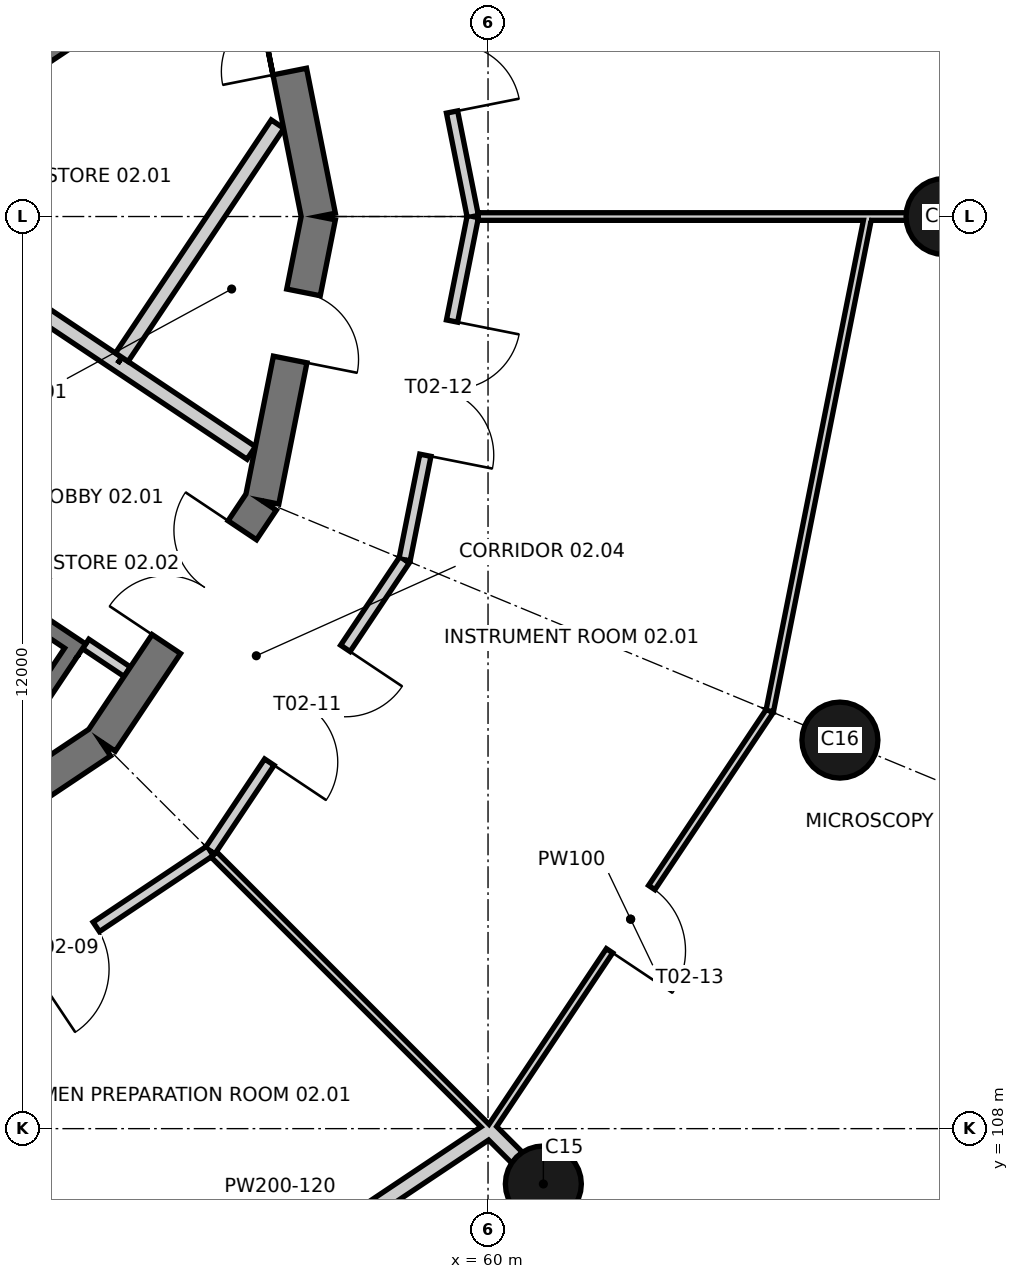
"""IFC4 building model, lengths in metres.
Left out: names, types, materials, properties, quantities, classifications, styles, units other than length and angle.
Written with IfcOpenShell. Run it as: python <this file> out.ifc"""

import sys

from ifc_helpers import new_model, si_unit, direction, frame, frame_2d, origin, origin_2d, place, context, subcontext, project, spatial, polyline, rectangle, circle, outline, extrude, element, fill, save


model = new_model("IFC4")
c1 = context("Model", 3, precision=1e-05, world=origin(), true_north=direction((0.0, 1.0)))
c2 = subcontext(c1, "Body", "Model", "MODEL_VIEW")
j1 = project(units=[si_unit("LENGTHUNIT", "METRE"), si_unit("PLANEANGLEUNIT", "RADIAN")], contexts=[c1])
p1 = place(None, origin())
s1 = spatial("IfcSite", under=j1, at=p1, CompositionType="ELEMENT")
p2 = place(p1, origin())
s2 = spatial("IfcBuilding", under=s1, at=p2, CompositionType="ELEMENT")
p3 = place(p2, frame((0.0, 0.0, 10.8)))
s3 = spatial("IfcBuildingStorey", under=s2, at=p3, CompositionType="ELEMENT", Elevation=10.8)
p4 = place(p3, frame((57.771, 120.0, 0.0), z_axis=(0.0, 0.0, 1.0), x_axis=(-0.195069197673, 0.98078948206, 0.0)))
e1 = element("IfcWall", 1, at=p4, inside=s3, PredefinedType="SHEAR", context=c2, shape_type="SweptSolid", body=[
    extrude(outline(polyline([(-0.045, -0.225), (3.857, -0.225), (3.768, 0.225), (0.045, 0.225), (-0.045, -0.225)])), origin(), (0.0, 0.0, 1.0), 4.8),
])
p5 = place(p4, frame((1.945, 0.0, 0.0)))
e2 = element("IfcOpeningElement", 2, at=p5, cuts=e1, PredefinedType="OPENING", context=c2, shape_type="SweptSolid", body=[
    extrude(rectangle(XDim=0.9, YDim=2.1, at=frame_2d((0.45, 1.05))), frame((0.0, 0.235, 0.0), z_axis=(0.0, -1.0, 0.0), x_axis=(1.0, 0.0, 0.0)), (0.0, 0.0, 1.0), 0.47),
])
p6 = place(p3, frame((51.739, 110.973, 0.0), z_axis=(0.0, 0.0, 1.0), x_axis=(0.83148829117, 0.555542277102, 0.0)))
e3 = element("IfcWall", 3, at=p6, inside=s3, PredefinedType="SHEAR", context=c2, shape_type="SweptSolid", body=[
    extrude(outline(polyline([(-0.045, -0.225), (3.857, -0.225), (3.768, 0.225), (0.045, 0.225), (-0.045, -0.225)])), origin(), (0.0, 0.0, 1.0), 4.8),
])
p7 = place(p6, frame((0.645, 0.0, 0.0)))
e4 = element("IfcOpeningElement", 4, at=p7, cuts=e3, PredefinedType="OPENING", context=c2, shape_type="SweptSolid", body=[
    extrude(rectangle(XDim=0.9, YDim=2.1, at=frame_2d((0.45, 1.05))), frame((0.0, 0.235, 0.0), z_axis=(0.0, -1.0, 0.0), x_axis=(1.0, 0.0, 0.0)), (0.0, 0.0, 1.0), 0.47),
])
p8 = place(p3, frame((54.909, 113.091, 0.0), z_axis=(0.0, 0.0, 1.0), x_axis=(0.555542277102, 0.83148829117, 0.0)))
e5 = element("IfcWall", 5, at=p8, inside=s3, PredefinedType="SHEAR", context=c2, shape_type="SweptSolid", body=[
    extrude(outline(polyline([(-0.045, -0.225), (3.857, -0.225), (3.768, 0.225), (0.045, 0.225), (-0.045, -0.225)])), origin(), (0.0, 0.0, 1.0), 4.8),
])
p9 = place(p8, frame((1.545, 0.0, 0.0)))
e6 = element("IfcOpeningElement", 6, at=p9, cuts=e5, PredefinedType="OPENING", context=c2, shape_type="SweptSolid", body=[
    extrude(rectangle(XDim=1.8, YDim=2.1, at=frame_2d((0.9, 1.05))), frame((0.0, 0.235, 0.0), z_axis=(0.0, -1.0, 0.0), x_axis=(1.0, 0.0, 0.0)), (0.0, 0.0, 1.0), 0.47),
])
p10 = place(p3, frame((57.027, 116.261, 0.0), z_axis=(0.0, 0.0, 1.0), x_axis=(0.195069197673, 0.98078948206, 0.0)))
e7 = element("IfcWall", 7, at=p10, inside=s3, PredefinedType="SHEAR", context=c2, shape_type="SweptSolid", body=[
    extrude(outline(polyline([(-0.045, -0.225), (3.857, -0.225), (3.768, 0.225), (0.045, 0.225), (-0.045, -0.225)])), origin(), (0.0, 0.0, 1.0), 4.8),
])
p11 = place(p10, frame((1.895, 0.0, 0.0)))
e8 = element("IfcOpeningElement", 8, at=p11, cuts=e7, PredefinedType="OPENING", context=c2, shape_type="SweptSolid", body=[
    extrude(rectangle(XDim=0.9, YDim=2.1, at=frame_2d((0.45, 1.05))), frame((0.0, 0.235, 0.0), z_axis=(0.0, -1.0, 0.0), x_axis=(1.0, 0.0, 0.0)), (0.0, 0.0, 1.0), 0.47),
])
p12 = place(p3, frame((50.226, 119.473, 0.0), z_axis=(0.0, 0.0, 1.0), x_axis=(0.831486463828, 0.555545012102, 0.0)))
e9 = element("IfcWall", 9, at=p12, inside=s3, PredefinedType="SHEAR", context=c2, shape_type="SweptSolid", body=[
    extrude(rectangle(XDim=7.8, YDim=0.2, at=frame_2d((3.9, 0.0))), origin(), (0.0, 0.0, 1.0), 4.8),
])
p13 = place(p3, frame((50.16, 117.293, 0.0), z_axis=(0.0, 0.0, 1.0), x_axis=(0.831479497601, -0.55555543834, 0.0)))
e10 = element("IfcWall", 10, at=p13, inside=s3, PredefinedType="SHEAR", context=c2, shape_type="SweptSolid", body=[
    extrude(rectangle(XDim=5.4, YDim=0.2, at=frame_2d((2.7, 0.0))), origin(), (0.0, 0.0, 1.0), 4.8),
])
p14 = place(p13, frame((0.85, 0.0, 0.0)))
e11 = element("IfcOpeningElement", 11, at=p14, cuts=e10, PredefinedType="OPENING", context=c2, shape_type="SweptSolid", body=[
    extrude(rectangle(XDim=1.1, YDim=2.1, at=frame_2d((0.55, 1.05))), frame((0.0, 0.11, 0.0), z_axis=(0.0, -1.0, 0.0), x_axis=(1.0, 0.0, 0.0)), (0.0, 0.0, 1.0), 0.22),
])
p15 = place(p13, frame((3.45, 0.0, 0.0)))
e12 = element("IfcOpeningElement", 12, at=p15, cuts=e10, PredefinedType="OPENING", context=c2, shape_type="SweptSolid", body=[
    extrude(rectangle(XDim=1.1, YDim=2.1, at=frame_2d((0.55, 1.05))), frame((0.0, 0.11, 0.0), z_axis=(0.0, -1.0, 0.0), x_axis=(1.0, 0.0, 0.0)), (0.0, 0.0, 1.0), 0.22),
])
p16 = place(p3, frame((54.512, 114.266, 0.0), z_axis=(0.0, 0.0, 1.0), x_axis=(-0.555589423235, -0.83145678949, 0.0)))
e13 = element("IfcWall", 13, at=p16, inside=s3, PredefinedType="SHEAR", context=c2, shape_type="SweptSolid", body=[
    extrude(rectangle(XDim=1.9, YDim=0.2, at=frame_2d((0.95, 0.0))), origin(), (0.0, 0.0, 1.0), 4.8),
])
for number, where, z_axis, x_axis in (
    (14, (66.0, 120.0, 0.0), (0.0, 0.0, 1.0), (1.0, 0.0, 0.0)),
    (15, (60.728, 107.272, 0.0), (0.0, 0.0, 1.0), (1.0, 0.0, 0.0)),
    (16, (64.63, 113.112, 0.0), (0.0, 0.0, 1.0), (1.0, 0.0, 0.0)),
):
    element("IfcColumn", number, at=place(p3, frame(where, z_axis=z_axis, x_axis=x_axis)), inside=s3, PredefinedType="COLUMN", context=c2, shape_type="SweptSolid", body=[
        extrude(circle(Radius=0.5, at=origin_2d()), origin(), (0.0, 0.0, 1.0), 4.8),
    ])
p17 = place(p3, frame((64.193, 103.807, 0.0), z_axis=(0.0, 0.0, 1.0), x_axis=(0.555576354317, 0.83146552215, 0.0)))
e17 = element("IfcWall", 17, at=p17, inside=s3, PredefinedType="SOLIDWALL", context=c2, shape_type="SweptSolid", body=[
    extrude(outline(polyline([(-0.03, -0.15), (8.965, -0.15), (8.905, 0.15), (0.03, 0.15), (-0.03, -0.15)])), origin(), (0.0, 0.0, 1.0), 3.72),
])
p18 = place(p17, frame((0.834, 0.0, 0.9)))
e18 = element("IfcOpeningElement", 18, at=p18, cuts=e17, PredefinedType="OPENING", context=c2, shape_type="SweptSolid", body=[
    extrude(rectangle(XDim=2.8, YDim=1.8, at=frame_2d((1.4, 0.9))), frame((0.0, 0.16, 0.0), z_axis=(0.0, -1.0, 0.0), x_axis=(1.0, 0.0, 0.0)), (0.0, 0.0, 1.0), 0.32),
])
p19 = place(p17, frame((5.302, 0.0, 0.9)))
e19 = element("IfcOpeningElement", 19, at=p19, cuts=e17, PredefinedType="OPENING", context=c2, shape_type="SweptSolid", body=[
    extrude(rectangle(XDim=2.8, YDim=1.8, at=frame_2d((1.4, 0.9))), frame((0.0, 0.16, 0.0), z_axis=(0.0, -1.0, 0.0), x_axis=(1.0, 0.0, 0.0)), (0.0, 0.0, 1.0), 0.32),
])
p20 = place(p3, frame((55.126, 118.065, 0.0), z_axis=(0.0, 0.0, 1.0), x_axis=(-0.831495502265, 0.555531483998, 0.0)))
e20 = element("IfcWall", 20, at=p20, inside=s3, PredefinedType="SOLIDWALL", context=c2, shape_type="SweptSolid", body=[
    extrude(rectangle(XDim=4.065, YDim=0.2, at=frame_2d((2.033, 0.0))), origin(), (0.0, 0.0, 1.0), 4.52),
])
p21 = place(p3, frame((57.231, 121.215, 0.0), z_axis=(0.0, 0.0, 1.0), x_axis=(-0.555600969312, -0.831449074147, 0.0)))
e21 = element("IfcWall", 21, at=p21, inside=s3, PredefinedType="SOLIDWALL", context=c2, shape_type="SweptSolid", body=[
    extrude(rectangle(XDim=3.689, YDim=0.2, at=frame_2d((1.844, 0.0))), origin(), (0.0, 0.0, 1.0), 4.52),
])
p22 = place(p3, frame((56.885, 116.89, 0.0), z_axis=(0.0, 0.0, 1.0), x_axis=(-0.831446094913, 0.555605427667, 0.0)))
e22 = element("IfcWall", 22, at=p22, inside=s3, PredefinedType="SOLIDWALL", context=c2, shape_type="SweptSolid", body=[
    extrude(rectangle(XDim=2.115, YDim=0.2, at=frame_2d((1.058, 0.0))), origin(), (0.0, 0.0, 1.0), 4.52),
])
p23 = place(p3, frame((54.706, 114.377, 0.0), z_axis=(0.0, 0.0, 1.0), x_axis=(0.831421626399, -0.555642042286, 0.0)))
e23 = element("IfcWall", 23, at=p23, inside=s3, PredefinedType="PARTITIONING", context=c2, shape_type="SweptSolid", body=[
    extrude(rectangle(XDim=0.658, YDim=0.15, at=frame_2d((0.329, 0.0))), origin(), (0.0, 0.0, 1.0), 4.52),
])
p24 = place(p3, frame((58.902, 124.516, 0.0), z_axis=(0.0, 0.0, 1.0), x_axis=(0.19508608079, -0.980786124026, 0.0)))
e24 = element("IfcWall", 24, at=p24, inside=s3, PredefinedType="PARTITIONING", context=c2, shape_type="SweptSolid", body=[
    extrude(rectangle(XDim=4.604, YDim=0.15, at=frame_2d((2.302, 0.0))), origin(), (0.0, 0.0, 1.0), 4.52),
])
p25 = place(p24, frame((1.402, 0.0, 0.0)))
e25 = element("IfcOpeningElement", 25, at=p25, cuts=e24, PredefinedType="OPENING", context=c2, shape_type="SweptSolid", body=[
    extrude(rectangle(XDim=1.8, YDim=2.1, at=frame_2d((0.9, 1.05))), frame((0.0, 0.085, 0.0), z_axis=(0.0, -1.0, 0.0), x_axis=(1.0, 0.0, 0.0)), (0.0, 0.0, 1.0), 0.17),
])
p26 = place(p3, frame((56.344, 111.656, 0.0), z_axis=(0.0, 0.0, 1.0), x_axis=(-0.831486983854, -0.555544233776, 0.0)))
e26 = element("IfcWall", 26, at=p26, inside=s3, PredefinedType="PARTITIONING", context=c2, shape_type="SweptSolid", body=[
    extrude(rectangle(XDim=4.604, YDim=0.15, at=frame_2d((2.302, 0.0))), origin(), (0.0, 0.0, 1.0), 4.52),
])
p27 = place(p26, frame((1.802, 0.0, 0.0)))
e27 = element("IfcOpeningElement", 27, at=p27, cuts=e26, PredefinedType="OPENING", context=c2, shape_type="SweptSolid", body=[
    extrude(rectangle(XDim=1.0, YDim=2.1, at=frame_2d((0.5, 1.05))), frame((0.0, 0.085, 0.0), z_axis=(0.0, -1.0, 0.0), x_axis=(1.0, 0.0, 0.0)), (0.0, 0.0, 1.0), 0.17),
])
p28 = place(p3, frame((59.8, 120.0, 0.0), z_axis=(0.0, 0.0, 1.0), x_axis=(-0.19508608079, -0.980786124026, 0.0)))
e28 = element("IfcWall", 28, at=p28, inside=s3, PredefinedType="PARTITIONING", context=c2, shape_type="SweptSolid", body=[
    extrude(rectangle(XDim=4.604, YDim=0.15, at=frame_2d((2.302, 0.0))), origin(), (0.0, 0.0, 1.0), 4.52),
])
p29 = place(p28, frame((1.402, 0.0, 0.0)))
e29 = element("IfcOpeningElement", 29, at=p29, cuts=e28, PredefinedType="OPENING", context=c2, shape_type="SweptSolid", body=[
    extrude(rectangle(XDim=1.8, YDim=2.1, at=frame_2d((0.9, 1.05))), frame((0.0, 0.085, 0.0), z_axis=(0.0, -1.0, 0.0), x_axis=(1.0, 0.0, 0.0)), (0.0, 0.0, 1.0), 0.17),
])
p30 = place(p3, frame((58.902, 115.484, 0.0), z_axis=(0.0, 0.0, 1.0), x_axis=(-0.555544233776, -0.831486983854, 0.0)))
e30 = element("IfcWall", 30, at=p30, inside=s3, PredefinedType="PARTITIONING", context=c2, shape_type="SweptSolid", body=[
    extrude(rectangle(XDim=4.604, YDim=0.15, at=frame_2d((2.302, 0.0))), origin(), (0.0, 0.0, 1.0), 4.52),
])
p31 = place(p30, frame((1.402, 0.0, 0.0)))
e31 = element("IfcOpeningElement", 31, at=p31, cuts=e30, PredefinedType="OPENING", context=c2, shape_type="SweptSolid", body=[
    extrude(rectangle(XDim=1.8, YDim=2.1, at=frame_2d((0.9, 1.05))), frame((0.0, 0.085, 0.0), z_axis=(0.0, -1.0, 0.0), x_axis=(1.0, 0.0, 0.0)), (0.0, 0.0, 1.0), 0.17),
])
p32 = place(p3, frame((52.543, 109.032, 0.0), z_axis=(0.0, 0.0, 1.0), x_axis=(0.382697954548, -0.923873517093, 0.0)))
e32 = element("IfcWall", 32, at=p32, inside=s3, PredefinedType="PARTITIONING", context=c2, shape_type="SweptSolid", body=[
    extrude(rectangle(XDim=5.128, YDim=0.1, at=frame_2d((2.564, 0.0))), origin(), (0.0, 0.0, 1.0), 3.72),
])
p33 = place(p3, frame((59.983, 107.954, 0.0), z_axis=(0.0, 0.0, 1.0), x_axis=(-0.831469879838, -0.555569832625, 0.0)))
e33 = element("IfcWall", 33, at=p33, inside=s3, PredefinedType="SOLIDWALL", context=c2, shape_type="SweptSolid", body=[
    extrude(rectangle(XDim=6.541, YDim=0.2, at=frame_2d((3.271, 0.0))), origin(), (0.0, 0.0, 1.0), 4.52),
])
p34 = place(p33, frame((2.82, 0.0, 0.0)))
e34 = element("IfcOpeningElement", 34, at=p34, cuts=e33, PredefinedType="OPENING", context=c2, shape_type="SweptSolid", body=[
    extrude(rectangle(XDim=0.9, YDim=2.1, at=frame_2d((0.45, 1.05))), frame((0.0, 0.11, 0.0), z_axis=(0.0, -1.0, 0.0), x_axis=(1.0, 0.0, 0.0)), (0.0, 0.0, 1.0), 0.22),
])
p35 = place(p3, frame((56.395, 111.605, 0.0), z_axis=(0.0, 0.0, 1.0), x_axis=(0.707106781187, -0.707106781187, 0.0)))
e35 = element("IfcWall", 35, at=p35, inside=s3, PredefinedType="PARTITIONING", context=c2, shape_type="SweptSolid", body=[
    extrude(rectangle(XDim=5.128, YDim=0.1, at=frame_2d((2.564, 0.0))), origin(), (0.0, 0.0, 1.0), 3.72),
])
p36 = place(p3, frame((60.021, 107.979, 0.0), z_axis=(0.0, 0.0, 1.0), x_axis=(0.707106781187, -0.707106781187, 0.0)))
e36 = element("IfcWall", 36, at=p36, inside=s3, PredefinedType="SOLIDWALL", context=c2, shape_type="SweptSolid", body=[
    extrude(rectangle(XDim=0.51, YDim=0.2, at=frame_2d((0.255, 0.0))), origin(), (0.0, 0.0, 1.0), 3.72),
])
p37 = place(p3, frame((64.991, 119.955, 0.0), z_axis=(0.0, 0.0, 1.0), x_axis=(-0.195068250166, -0.980789670509, 0.0)))
e37 = element("IfcWall", 37, at=p37, inside=s3, PredefinedType="PARTITIONING", context=c2, shape_type="SweptSolid", body=[
    extrude(rectangle(XDim=6.587, YDim=0.1, at=frame_2d((3.293, 0.0))), origin(), (0.0, 0.0, 1.0), 4.52),
])
p38 = place(p3, frame((63.706, 113.494, 0.0), z_axis=(0.0, 0.0, 1.0), x_axis=(-0.555572294061, -0.831468235155, 0.0)))
e38 = element("IfcWall", 38, at=p38, inside=s3, PredefinedType="PARTITIONING", context=c2, shape_type="SweptSolid", body=[
    extrude(rectangle(XDim=6.587, YDim=0.1, at=frame_2d((3.293, 0.0))), origin(), (0.0, 0.0, 1.0), 4.52),
])
p39 = place(p38, frame((2.793, 0.0, 0.0)))
e39 = element("IfcOpeningElement", 39, at=p39, cuts=e38, PredefinedType="OPENING", context=c2, shape_type="SweptSolid", body=[
    extrude(rectangle(XDim=1.0, YDim=2.1, at=frame_2d((0.5, 1.05))), frame((0.0, 0.06, 0.0), z_axis=(0.0, -1.0, 0.0), x_axis=(1.0, 0.0, 0.0)), (0.0, 0.0, 1.0), 0.12),
])
p40 = place(p3, frame((59.872, 120.0, 0.0), z_axis=(0.0, 0.0, 1.0), x_axis=(1.0, 0.0, 0.0)))
e40 = element("IfcWall", 40, at=p40, inside=s3, PredefinedType="PARTITIONING", context=c2, shape_type="SweptSolid", body=[
    extrude(rectangle(XDim=5.128, YDim=0.1, at=frame_2d((2.564, 0.0))), origin(), (0.0, 0.0, 1.0), 3.72),
])
p41 = place(p3, frame((65.0, 120.0, 0.0), z_axis=(0.0, 0.0, 1.0), x_axis=(1.0, 0.0, 0.0)))
e41 = element("IfcWall", 41, at=p41, inside=s3, PredefinedType="PARTITIONING", context=c2, shape_type="SweptSolid", body=[
    extrude(rectangle(XDim=0.51, YDim=0.1, at=frame_2d((0.255, 0.0))), origin(), (0.0, 0.0, 1.0), 3.72),
])
p42 = place(p5, origin())
e42 = element("IfcDoor", 42, at=p42, inside=s3, OperationType="SINGLE_SWING_LEFT", PredefinedType="DOOR", context=c2, shape_type="SweptSolid", body=[
    extrude(rectangle(XDim=0.9, YDim=2.1, at=frame_2d((0.45, 1.05))), frame((0.0, 0.025, 0.0), z_axis=(0.0, -1.0, 0.0), x_axis=(1.0, 0.0, 0.0)), (0.0, 0.0, 1.0), 0.05),
])
fill(e2, e42)
p43 = place(p11, frame((0.9, 0.0, 0.0), z_axis=(0.0, 0.0, 1.0), x_axis=(-1.0, 0.0, 0.0)))
e43 = element("IfcDoor", 43, at=p43, inside=s3, OperationType="SINGLE_SWING_RIGHT", PredefinedType="DOOR", context=c2, shape_type="SweptSolid", body=[
    extrude(rectangle(XDim=0.9, YDim=2.1, at=frame_2d((0.45, 1.05))), frame((0.0, 0.025, 0.0), z_axis=(0.0, -1.0, 0.0), x_axis=(1.0, 0.0, 0.0)), (0.0, 0.0, 1.0), 0.05),
])
fill(e8, e43)
p44 = place(p9, origin())
e44 = element("IfcDoor", 44, at=p44, inside=s3, OperationType="DOUBLE_DOOR_SINGLE_SWING", PredefinedType="DOOR", context=c2, shape_type="SweptSolid", body=[
    extrude(rectangle(XDim=1.8, YDim=2.1, at=frame_2d((0.9, 1.05))), frame((0.0, 0.025, 0.0), z_axis=(0.0, -1.0, 0.0), x_axis=(1.0, 0.0, 0.0)), (0.0, 0.0, 1.0), 0.05),
])
fill(e6, e44)
p45 = place(p27, origin())
e45 = element("IfcDoor", 45, at=p45, inside=s3, OperationType="SINGLE_SWING_RIGHT", PredefinedType="DOOR", context=c2, shape_type="SweptSolid", body=[
    extrude(rectangle(XDim=1.0, YDim=2.1, at=frame_2d((0.5, 1.05))), frame((0.0, 0.025, 0.0), z_axis=(0.0, -1.0, 0.0), x_axis=(1.0, 0.0, 0.0)), (0.0, 0.0, 1.0), 0.05),
])
fill(e27, e45)
p46 = place(p31, origin())
e46 = element("IfcDoor", 46, at=p46, inside=s3, OperationType="DOUBLE_DOOR_SINGLE_SWING", PredefinedType="DOOR", context=c2, shape_type="SweptSolid", body=[
    extrude(rectangle(XDim=1.8, YDim=2.1, at=frame_2d((0.9, 1.05))), frame((0.0, 0.025, 0.0), z_axis=(0.0, -1.0, 0.0), x_axis=(1.0, 0.0, 0.0)), (0.0, 0.0, 1.0), 0.05),
])
fill(e31, e46)
p47 = place(p29, origin())
e47 = element("IfcDoor", 47, at=p47, inside=s3, OperationType="DOUBLE_DOOR_SINGLE_SWING", PredefinedType="DOOR", context=c2, shape_type="SweptSolid", body=[
    extrude(rectangle(XDim=1.8, YDim=2.1, at=frame_2d((0.9, 1.05))), frame((0.0, 0.025, 0.0), z_axis=(0.0, -1.0, 0.0), x_axis=(1.0, 0.0, 0.0)), (0.0, 0.0, 1.0), 0.05),
])
fill(e29, e47)
p48 = place(p39, origin())
e48 = element("IfcDoor", 48, at=p48, inside=s3, OperationType="SINGLE_SWING_RIGHT", PredefinedType="DOOR", context=c2, shape_type="SweptSolid", body=[
    extrude(rectangle(XDim=1.0, YDim=2.1, at=frame_2d((0.5, 1.05))), frame((0.0, 0.025, 0.0), z_axis=(0.0, -1.0, 0.0), x_axis=(1.0, 0.0, 0.0)), (0.0, 0.0, 1.0), 0.05),
])
fill(e39, e48)
p49 = place(p25, origin())
e49 = element("IfcDoor", 49, at=p49, inside=s3, OperationType="DOUBLE_DOOR_SINGLE_SWING", PredefinedType="DOOR", context=c2, shape_type="SweptSolid", body=[
    extrude(rectangle(XDim=1.8, YDim=2.1, at=frame_2d((0.9, 1.05))), frame((0.0, 0.025, 0.0), z_axis=(0.0, -1.0, 0.0), x_axis=(1.0, 0.0, 0.0)), (0.0, 0.0, 1.0), 0.05),
])
fill(e25, e49)
save(model, sys.argv[1])
